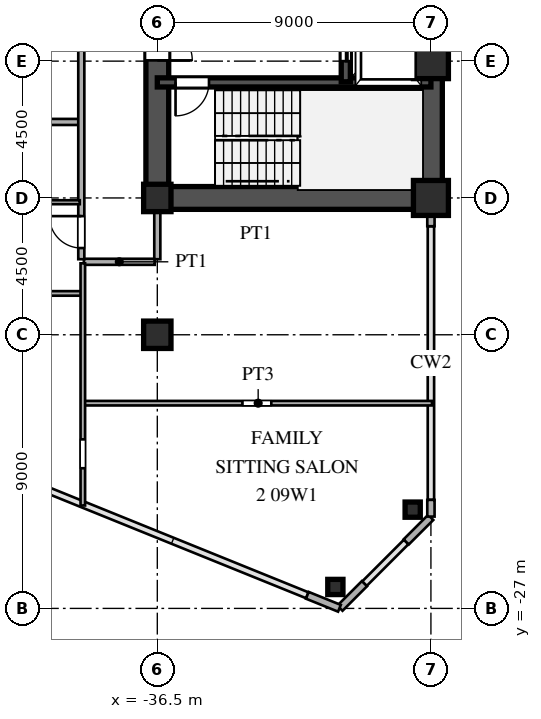
"""IFC4 building model, lengths in metres.
Left out: names, types, materials, properties, quantities, classifications, styles, units other than length and angle.
Written with IfcOpenShell. Run it as: python <this file> out.ifc"""

import sys

from ifc_helpers import new_model, si_unit, direction, frame, frame_2d, origin, origin_2d, place, context, subcontext, project, spatial, rectangle, hollow_rectangle, i_section, extrude, source, transform, mapped, element, fill, save


model = new_model("IFC4")
c1 = context("Model", 3, precision=1e-05, world=origin(), true_north=direction((0.0, 1.0)))
c2 = subcontext(c1, "Body", "Model", "MODEL_VIEW")
j1 = project(units=[si_unit("LENGTHUNIT", "METRE"), si_unit("PLANEANGLEUNIT", "RADIAN")], contexts=[c1])
p1 = place(None, origin())
s1 = spatial("IfcSite", under=j1, at=p1, CompositionType="ELEMENT")
p2 = place(p1, origin())
s2 = spatial("IfcBuilding", under=s1, at=p2, CompositionType="ELEMENT")
p3 = place(p2, frame((0.0, 0.0, 36.9)))
s3 = spatial("IfcBuildingStorey", under=s2, at=p3, CompositionType="ELEMENT", Elevation=36.9)
m1 = source(origin(), c2, "Body", "SweptSolid", [
    extrude(hollow_rectangle(XDim=1.15, YDim=1.15, WallThickness=0.048, at=origin_2d()), origin(), (0.0, 0.0, 1.0), 3.6),
])
for number, where, z_axis, x_axis in (
    (1, (-27.5, -13.5, 0.0), (0.0, 0.0, 1.0), (1.0, 0.0, 0.0)),
    (2, (-27.5, -9.0, 0.0), (0.0, 0.0, 1.0), (1.0, 0.0, 0.0)),
):
    element("IfcColumn", number, at=place(p3, frame(where, z_axis=z_axis, x_axis=x_axis)), inside=s3, PredefinedType="COLUMN", context=c2, shape_type="MappedRepresentation", body=[
        mapped(m1, transform((0.0, 0.0, 0.0), scale=1.0)),
    ])
m2 = source(origin(), c2, "Body", "SweptSolid", [
    extrude(i_section(OverallWidth=0.9, OverallDepth=0.9, WebThickness=0.036, FlangeThickness=0.055, at=origin_2d()), origin(), (0.0, 0.0, 1.0), 3.6),
])
for number, where, z_axis, x_axis in (
    (3, (-36.5, -18.0, 0.0), (0.0, 0.0, 1.0), (1.0, 0.0, 0.0)),
    (4, (-36.5, -13.5, 0.0), (0.0, 0.0, 1.0), (1.0, 0.0, 0.0)),
):
    element("IfcColumn", number, at=place(p3, frame(where, z_axis=z_axis, x_axis=x_axis)), inside=s3, PredefinedType="COLUMN", context=c2, shape_type="MappedRepresentation", body=[
        mapped(m2, transform((0.0, 0.0, 0.0), scale=1.0)),
    ])
m3 = source(origin(), c2, "Body", "SweptSolid", [
    extrude(hollow_rectangle(XDim=0.5, YDim=0.5, WallThickness=0.02, at=origin_2d()), origin(), (0.0, 0.0, 1.0), 3.6),
])
for number, where, z_axis, x_axis in (
    (5, (-28.1, -23.751, 0.0), (0.0, 0.0, 1.0), (1.0, 0.0, 0.0)),
    (6, (-30.643, -26.295, 0.0), (0.0, 0.0, 1.0), (1.0, 0.0, 0.0)),
):
    element("IfcColumn", number, at=place(p3, frame(where, z_axis=z_axis, x_axis=x_axis)), inside=s3, PredefinedType="COLUMN", context=c2, shape_type="MappedRepresentation", body=[
        mapped(m3, transform((0.0, 0.0, 0.0), scale=1.0)),
    ])
p4 = place(p3, frame((-27.5, -23.98, 0.0), z_axis=(0.0, 0.0, 1.0), x_axis=(0.0, 1.0, 0.0)))
e7 = element("IfcWall", 7, at=p4, inside=s3, PredefinedType="SOLIDWALL", context=c2, shape_type="SweptSolid", body=[
    extrude(rectangle(XDim=0.55, YDim=0.24, at=frame_2d((0.275, 0.0))), origin(), (0.0, 0.0, 1.0), 3.38),
])
p5 = place(p3, frame((-27.5, -14.43, 0.0), z_axis=(0.0, 0.0, 1.0), x_axis=(0.0, 1.0, 0.0)))
e8 = element("IfcWall", 8, at=p5, inside=s3, PredefinedType="SOLIDWALL", context=c2, shape_type="SweptSolid", body=[
    extrude(rectangle(XDim=0.55, YDim=0.24, at=frame_2d((0.275, 0.0))), origin(), (0.0, 0.0, 1.0), 2.88),
])
p6 = place(p3, frame((-31.566, -26.569, 0.0), z_axis=(0.0, 0.0, 1.0), x_axis=(0.927007103665, -0.375043770452, 0.0)))
e9 = element("IfcWall", 9, at=p6, inside=s3, PredefinedType="SOLIDWALL", context=c2, shape_type="SweptSolid", body=[
    extrude(rectangle(XDim=1.14, YDim=0.24, at=frame_2d((0.57, 0.0))), origin(), (0.0, 0.0, 1.0), 3.38),
])
for number, where, z_axis, x_axis in (
    (10, (-30.493, -26.993, 0.0), (0.0, 0.0, 1.0), (0.707, 0.707, 0.0)),
    (11, (-28.313, -24.813, 0.0), (0.0, 0.0, 1.0), (0.707, 0.707, 0.0)),
):
    element("IfcWall", number, at=place(p3, frame(where, z_axis=z_axis, x_axis=x_axis)), inside=s3, PredefinedType="SOLIDWALL", context=c2, shape_type="SweptSolid", body=[
        extrude(rectangle(XDim=1.14, YDim=0.24, at=frame_2d((0.57, 0.0))), origin(), (0.0, 0.0, 1.0), 3.38),
    ])
p7 = place(p3, frame((-27.5, -13.5, 0.0), z_axis=(0.0, 0.0, 1.0), x_axis=(0.0, 1.0, 0.0)))
e12 = element("IfcWall", 12, at=p7, inside=s3, PredefinedType="SHEAR", context=c2, shape_type="SweptSolid", body=[
    extrude(rectangle(XDim=12.2, YDim=0.75, at=frame_2d((6.1, 0.0))), origin(), (0.0, 0.0, 1.0), 3.38),
])
p8 = place(p3, frame((-36.5, -13.5, 0.0), z_axis=(0.0, 0.0, 1.0), x_axis=(1.0, 0.0, 0.0)))
e13 = element("IfcWall", 13, at=p8, inside=s3, PredefinedType="SHEAR", context=c2, shape_type="SweptSolid", body=[
    extrude(rectangle(XDim=9.0, YDim=0.75, at=frame_2d((4.5, 0.0))), origin(), (0.0, 0.0, 1.0), 3.38),
])
p9 = place(p3, frame((-36.5, -13.65, 0.0), z_axis=(0.0, 0.0, 1.0), x_axis=(0.0, 1.0, 0.0)))
e14 = element("IfcWall", 14, at=p9, inside=s3, PredefinedType="SHEAR", context=c2, shape_type="SweptSolid", body=[
    extrude(rectangle(XDim=7.15, YDim=0.75, at=frame_2d((3.575, 0.0))), origin(), (0.0, 0.0, 1.0), 3.38),
])
p10 = place(p9, frame((4.675, 0.0, 0.0)))
e15 = element("IfcOpeningElement", 15, at=p10, cuts=e14, PredefinedType="OPENING", context=c2, shape_type="SweptSolid", body=[
    extrude(rectangle(XDim=1.15, YDim=2.2, at=frame_2d((0.575, 1.1))), frame((0.0, 0.385, 0.0), z_axis=(0.0, -1.0, 0.0), x_axis=(1.0, 0.0, 0.0)), (0.0, 0.0, 1.0), 0.77),
])
p11 = place(p3, frame((-36.5, -9.7, 0.0), z_axis=(0.0, 0.0, 1.0), x_axis=(1.0, 0.0, 0.0)))
e16 = element("IfcWall", 16, at=p11, inside=s3, PredefinedType="SHEAR", context=c2, shape_type="SweptSolid", body=[
    extrude(rectangle(XDim=9.0, YDim=0.3, at=frame_2d((4.5, 0.0))), origin(), (0.0, 0.0, 1.0), 3.38),
])
p12 = place(p11, frame((0.6, 0.0, 0.0)))
e17 = element("IfcOpeningElement", 17, at=p12, cuts=e16, PredefinedType="OPENING", context=c2, shape_type="SweptSolid", body=[
    extrude(rectangle(XDim=1.1, YDim=2.2, at=frame_2d((0.55, 1.1))), frame((0.0, 0.16, 0.0), z_axis=(0.0, -1.0, 0.0), x_axis=(1.0, 0.0, 0.0)), (0.0, 0.0, 1.0), 0.32),
])
p13 = place(p3, frame((-30.3, -9.68, 0.0), z_axis=(0.0, 0.0, 1.0), x_axis=(0.0, 1.0, 0.0)))
e18 = element("IfcWall", 18, at=p13, inside=s3, PredefinedType="SHEAR", context=c2, shape_type="SweptSolid", body=[
    extrude(rectangle(XDim=2.56, YDim=0.3, at=frame_2d((1.28, 0.0))), origin(), (0.0, 0.0, 1.0), 3.38),
])
p14 = place(p13, frame((0.68, 0.0, 0.0)))
e19 = element("IfcOpeningElement", 19, at=p14, cuts=e18, PredefinedType="OPENING", context=c2, shape_type="SweptSolid", body=[
    extrude(rectangle(XDim=1.2, YDim=2.25, at=frame_2d((0.6, 1.125))), frame((0.0, 0.16, 0.0), z_axis=(0.0, -1.0, 0.0), x_axis=(1.0, 0.0, 0.0)), (0.0, 0.0, 1.0), 0.32),
])
p15 = place(p3, frame((-38.9, -20.25, 0.0), z_axis=(0.0, 0.0, 1.0), x_axis=(1.0, 0.0, 0.0)))
e20 = element("IfcWall", 20, at=p15, inside=s3, PredefinedType="PARTITIONING", context=c2, shape_type="SweptSolid", body=[
    extrude(rectangle(XDim=11.435, YDim=0.15, at=frame_2d((5.717, 0.0))), origin(), (0.0, 0.0, 1.0), 3.38),
])
p16 = place(p15, frame((5.2, 0.0, 0.0)))
e21 = element("IfcOpeningElement", 21, at=p16, cuts=e20, PredefinedType="OPENING", context=c2, shape_type="SweptSolid", body=[
    extrude(rectangle(XDim=0.95, YDim=2.15, at=frame_2d((0.475, 1.075))), frame((0.0, 0.085, 0.0), z_axis=(0.0, -1.0, 0.0), x_axis=(1.0, 0.0, 0.0)), (0.0, 0.0, 1.0), 0.17),
])
p17 = place(p3, frame((-44.55, -16.64, 0.0), z_axis=(0.0, 0.0, 1.0), x_axis=(1.0, 0.0, 0.0)))
e22 = element("IfcWall", 22, at=p17, inside=s3, PredefinedType="PARTITIONING", context=c2, shape_type="SweptSolid", body=[
    extrude(rectangle(XDim=5.55, YDim=0.15, at=frame_2d((2.775, 0.0))), origin(), (0.0, 0.0, 1.0), 3.38),
])
p18 = place(p17, frame((2.3, 0.0, 0.0)))
e23 = element("IfcOpeningElement", 23, at=p18, cuts=e22, PredefinedType="OPENING", context=c2, shape_type="SweptSolid", body=[
    extrude(rectangle(XDim=0.95, YDim=2.15, at=frame_2d((0.475, 1.075))), frame((0.0, 0.085, 0.0), z_axis=(0.0, -1.0, 0.0), x_axis=(1.0, 0.0, 0.0)), (0.0, 0.0, 1.0), 0.17),
])
p19 = place(p3, frame((-38.915, -15.6, 0.0), z_axis=(0.0, 0.0, 1.0), x_axis=(1.0, 0.0, 0.0)))
e24 = element("IfcWall", 24, at=p19, inside=s3, PredefinedType="PARTITIONING", context=c2, shape_type="SweptSolid", body=[
    extrude(rectangle(XDim=2.33, YDim=0.2, at=frame_2d((1.165, 0.0))), origin(), (0.0, 0.0, 1.0), 3.38),
])
p20 = place(p3, frame((-44.55, -13.64, 0.0), z_axis=(0.0, 0.0, 1.0), x_axis=(1.0, 0.0, 0.0)))
e25 = element("IfcWall", 25, at=p20, inside=s3, PredefinedType="PARTITIONING", context=c2, shape_type="SweptSolid", body=[
    extrude(rectangle(XDim=5.5, YDim=0.13, at=frame_2d((2.75, 0.0))), origin(), (0.0, 0.0, 1.0), 2.68),
])
p21 = place(p20, frame((2.31, 0.0, 0.0)))
e26 = element("IfcOpeningElement", 26, at=p21, cuts=e25, PredefinedType="OPENING", context=c2, shape_type="SweptSolid", body=[
    extrude(rectangle(XDim=0.88, YDim=2.1, at=frame_2d((0.44, 1.05))), frame((0.0, 0.075, 0.0), z_axis=(0.0, -1.0, 0.0), x_axis=(1.0, 0.0, 0.0)), (0.0, 0.0, 1.0), 0.15),
])
p22 = place(p3, frame((-70.043, -11.0, 0.0), z_axis=(0.0, 0.0, 1.0), x_axis=(1.0, 0.0, 0.0)))
e27 = element("IfcWall", 27, at=p22, inside=s3, PredefinedType="PARTITIONING", context=c2, shape_type="SweptSolid", body=[
    extrude(rectangle(XDim=30.963, YDim=0.2, at=frame_2d((15.481, 0.0))), origin(), (0.0, 0.0, 1.0), 3.38),
])
p23 = place(p3, frame((-39.0, -15.515, 0.0), z_axis=(0.0, 0.0, 1.0), x_axis=(0.0, 1.0, 0.0)))
e28 = element("IfcWall", 28, at=p23, inside=s3, PredefinedType="PARTITIONING", context=c2, shape_type="SweptSolid", body=[
    extrude(rectangle(XDim=31.03, YDim=0.2, at=frame_2d((15.515, 0.0))), origin(), (0.0, 0.0, 1.0), 3.38),
])
p24 = place(p23, frame((0.367, 0.0, 0.0)))
e29 = element("IfcOpeningElement", 29, at=p24, cuts=e28, PredefinedType="OPENING", context=c2, shape_type="SweptSolid", body=[
    extrude(rectangle(XDim=1.05, YDim=2.25, at=frame_2d((0.525, 1.125))), frame((0.0, 0.11, 0.0), z_axis=(0.0, -1.0, 0.0), x_axis=(1.0, 0.0, 0.0)), (0.0, 0.0, 1.0), 0.22),
])
p25 = place(p23, frame((8.638, 0.0, 0.0)))
e30 = element("IfcOpeningElement", 30, at=p25, cuts=e28, PredefinedType="OPENING", context=c2, shape_type="SweptSolid", body=[
    extrude(rectangle(XDim=1.05, YDim=2.25, at=frame_2d((0.525, 1.125))), frame((0.0, 0.11, 0.0), z_axis=(0.0, -1.0, 0.0), x_axis=(1.0, 0.0, 0.0)), (0.0, 0.0, 1.0), 0.22),
])
p26 = place(p23, frame((19.795, 0.0, 0.0)))
e31 = element("IfcOpeningElement", 31, at=p26, cuts=e28, PredefinedType="OPENING", context=c2, shape_type="SweptSolid", body=[
    extrude(rectangle(XDim=1.05, YDim=2.25, at=frame_2d((0.525, 1.125))), frame((0.0, 0.11, 0.0), z_axis=(0.0, -1.0, 0.0), x_axis=(1.0, 0.0, 0.0)), (0.0, 0.0, 1.0), 0.22),
])
p27 = place(p23, frame((29.82, 0.0, 0.0)))
e32 = element("IfcOpeningElement", 32, at=p27, cuts=e28, PredefinedType="OPENING", context=c2, shape_type="SweptSolid", body=[
    extrude(rectangle(XDim=1.05, YDim=2.25, at=frame_2d((0.525, 1.125))), frame((0.0, 0.11, 0.0), z_axis=(0.0, -1.0, 0.0), x_axis=(1.0, 0.0, 0.0)), (0.0, 0.0, 1.0), 0.22),
])
p28 = place(p3, frame((-38.95, -23.615, 0.0), z_axis=(0.0, 0.0, 1.0), x_axis=(0.0, 1.0, 0.0)))
e33 = element("IfcWall", 33, at=p28, inside=s3, PredefinedType="PARTITIONING", context=c2, shape_type="SweptSolid", body=[
    extrude(rectangle(XDim=7.965, YDim=0.15, at=frame_2d((3.982, 0.0))), origin(), (0.0, 0.0, 1.0), 3.38),
])
p29 = place(p28, frame((1.225, 0.0, 0.0)))
e34 = element("IfcOpeningElement", 34, at=p29, cuts=e33, PredefinedType="OPENING", context=c2, shape_type="SweptSolid", body=[
    extrude(rectangle(XDim=0.95, YDim=2.15, at=frame_2d((0.475, 1.075))), frame((0.0, 0.085, 0.0), z_axis=(0.0, -1.0, 0.0), x_axis=(1.0, 0.0, 0.0)), (0.0, 0.0, 1.0), 0.17),
])
p30 = place(p3, frame((-36.5, -15.515, 0.0), z_axis=(0.0, 0.0, 1.0), x_axis=(0.0, 1.0, 0.0)))
e35 = element("IfcWall", 35, at=p30, inside=s3, PredefinedType="PARTITIONING", context=c2, shape_type="SweptSolid", body=[
    extrude(rectangle(XDim=1.635, YDim=0.2, at=frame_2d((0.817, 0.0))), origin(), (0.0, 0.0, 1.0), 2.68),
])
m4 = source(origin(), c2, "Body", "SweptSolid", [
    extrude(rectangle(XDim=1.15, YDim=2.2, at=frame_2d((0.575, 1.1))), frame((0.0, 0.025, 0.0), z_axis=(0.0, -1.0, 0.0), x_axis=(1.0, 0.0, 0.0)), (0.0, 0.0, 1.0), 0.05),
])
p31 = place(p10, frame((1.15, 0.0, 0.0), z_axis=(0.0, 0.0, 1.0), x_axis=(-1.0, 0.0, 0.0)))
e36 = element("IfcDoor", 36, at=p31, inside=s3, OperationType="SINGLE_SWING_LEFT", PredefinedType="DOOR", context=c2, shape_type="MappedRepresentation", body=[
    mapped(m4, transform((0.0, 0.0, 0.0), scale=1.0)),
])
fill(e15, e36)
m5 = source(origin(), c2, "Body", "SweptSolid", [
    extrude(rectangle(XDim=1.1, YDim=2.2, at=frame_2d((0.55, 1.1))), frame((0.0, 0.025, 0.0), z_axis=(0.0, -1.0, 0.0), x_axis=(1.0, 0.0, 0.0)), (0.0, 0.0, 1.0), 0.05),
])
p32 = place(p12, frame((1.1, 0.0, 0.0), z_axis=(0.0, 0.0, 1.0), x_axis=(-1.0, 0.0, 0.0)))
e37 = element("IfcDoor", 37, at=p32, inside=s3, OperationType="SINGLE_SWING_LEFT", PredefinedType="DOOR", context=c2, shape_type="MappedRepresentation", body=[
    mapped(m5, transform((0.0, 0.0, 0.0), scale=1.0)),
])
fill(e17, e37)
m6 = source(origin(), c2, "Body", "SweptSolid", [
    extrude(rectangle(XDim=1.2, YDim=2.25, at=frame_2d((0.6, 1.125))), frame((0.0, 0.025, 0.0), z_axis=(0.0, -1.0, 0.0), x_axis=(1.0, 0.0, 0.0)), (0.0, 0.0, 1.0), 0.05),
])
p33 = place(p14, origin())
e38 = element("IfcDoor", 38, at=p33, inside=s3, OperationType="DOUBLE_DOOR_SLIDING", PredefinedType="DOOR", context=c2, shape_type="MappedRepresentation", body=[
    mapped(m6, transform((0.0, 0.0, 0.0), scale=1.0)),
])
fill(e19, e38)
m7 = source(origin(), c2, "Body", "SweptSolid", [
    extrude(rectangle(XDim=1.05, YDim=2.25, at=frame_2d((0.525, 1.125))), frame((0.0, 0.025, 0.0), z_axis=(0.0, -1.0, 0.0), x_axis=(1.0, 0.0, 0.0)), (0.0, 0.0, 1.0), 0.05),
])
p34 = place(p24, origin())
e39 = element("IfcDoor", 39, at=p34, inside=s3, OperationType="SINGLE_SWING_RIGHT", PredefinedType="DOOR", context=c2, shape_type="MappedRepresentation", body=[
    mapped(m7, transform((0.0, 0.0, 0.0), scale=1.0)),
])
fill(e29, e39)
save(model, sys.argv[1])
